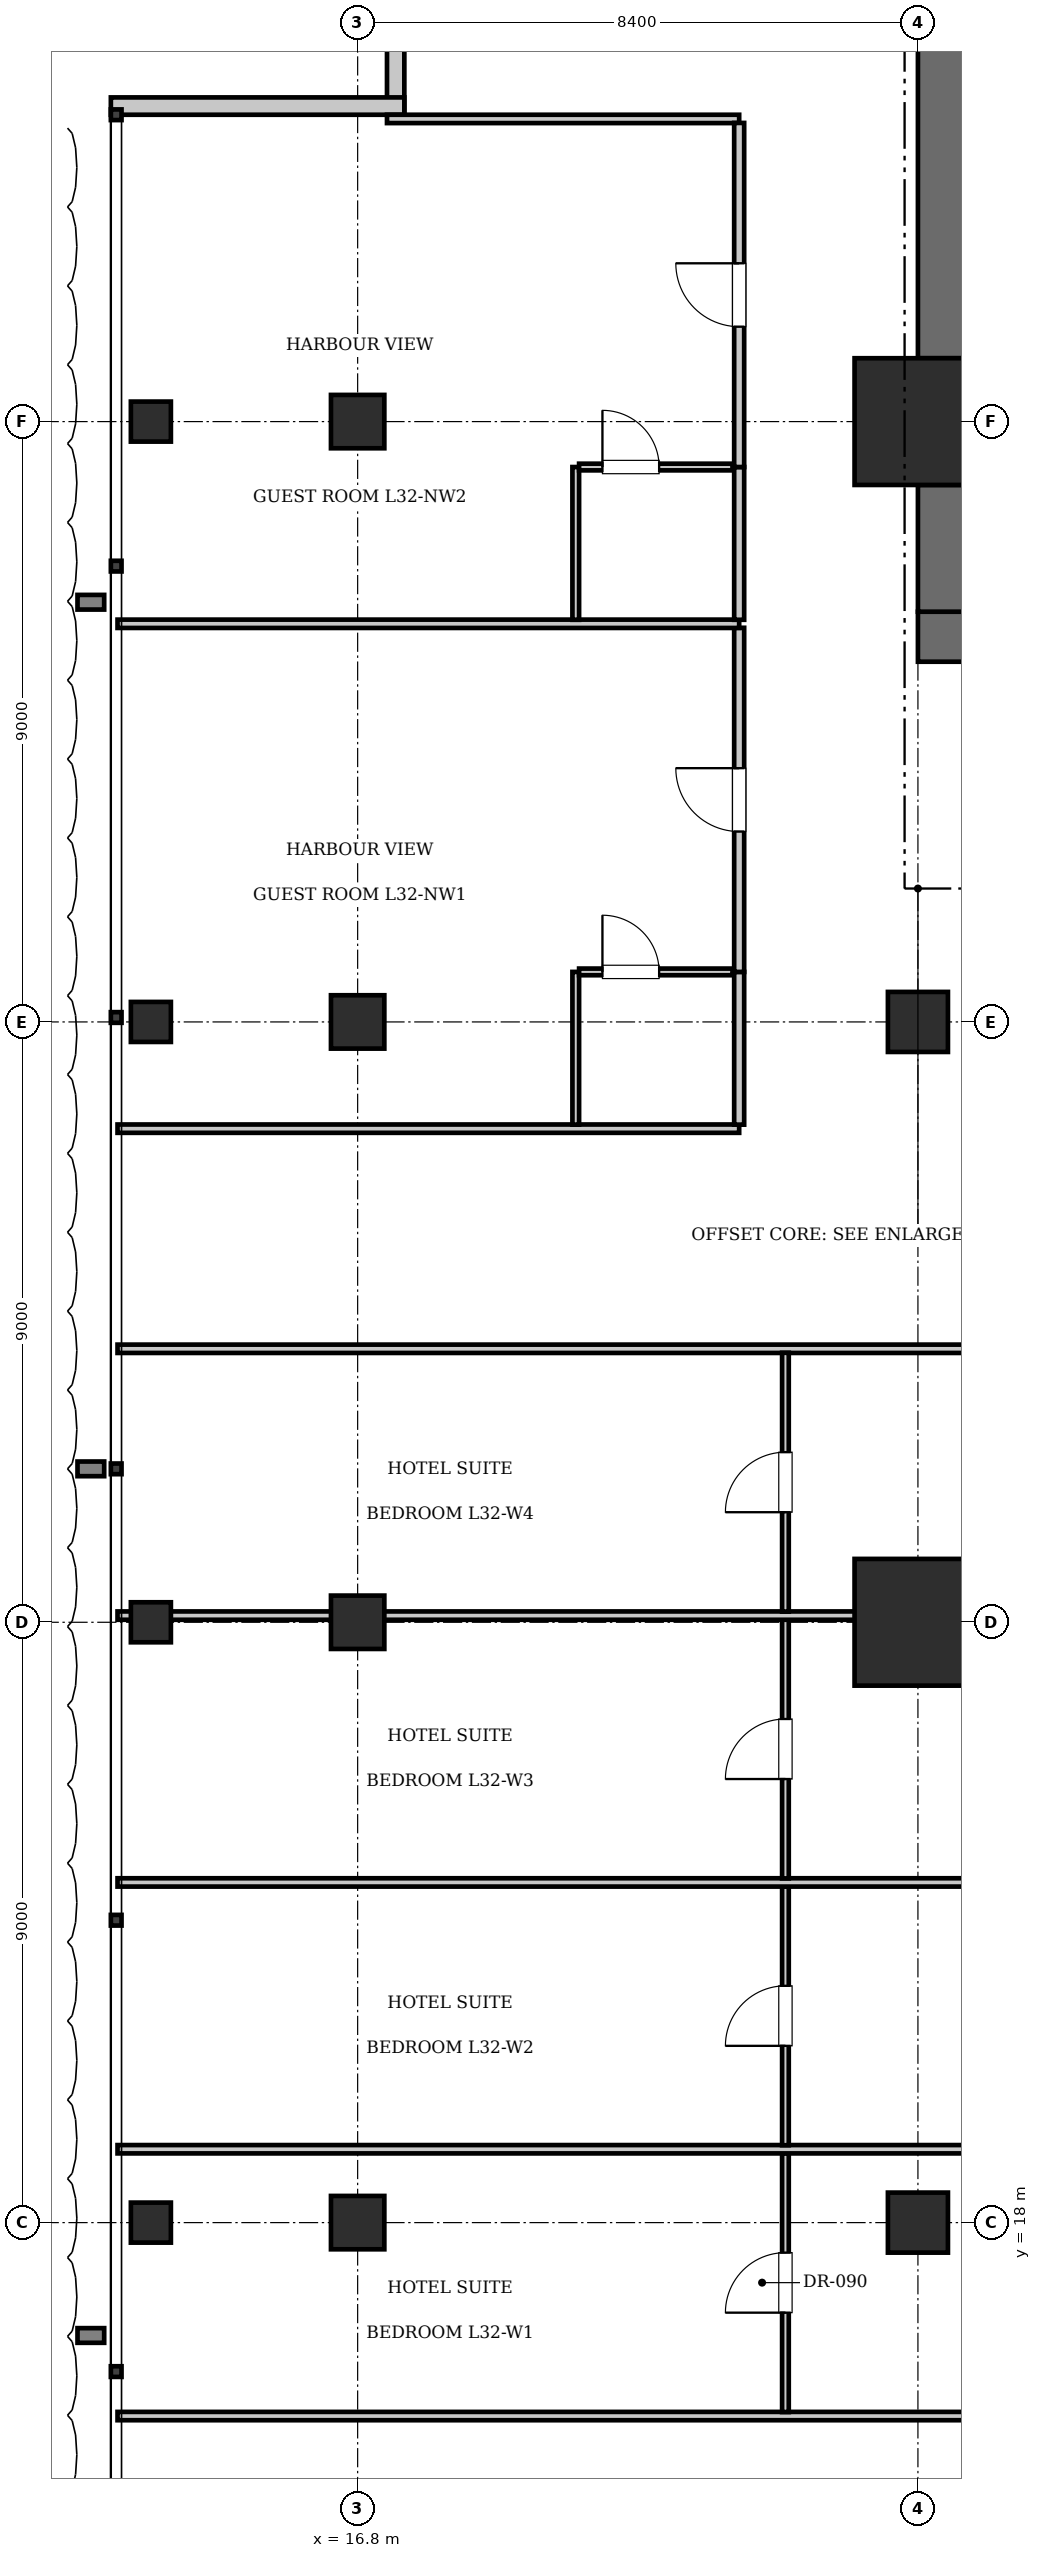
"""IFC4 building model, lengths in metres.
Left out: names, types, materials, properties, quantities, classifications, styles, units other than length and angle.
Written with IfcOpenShell. Run it as: python <this file> out.ifc"""

import sys

from ifc_helpers import new_model, si_unit, direction, frame, frame_2d, origin, origin_2d, place, context, subcontext, project, spatial, rectangle, i_section, extrude, element, fill, save


model = new_model("IFC4")
c1 = context("Model", 3, precision=1e-05, world=origin(), true_north=direction((0.0, 1.0)))
c2 = subcontext(c1, "Body", "Model", "MODEL_VIEW")
j1 = project(units=[si_unit("LENGTHUNIT", "METRE"), si_unit("PLANEANGLEUNIT", "RADIAN")], contexts=[c1])
p1 = place(None, origin())
s1 = spatial("IfcSite", under=j1, at=p1, CompositionType="ELEMENT")
p2 = place(p1, origin())
s2 = spatial("IfcBuilding", under=s1, at=p2, CompositionType="ELEMENT")
p3 = place(p2, frame((0.0, 0.0, 135.1)))
s3 = spatial("IfcBuildingStorey", under=s2, at=p3, CompositionType="ELEMENT", Elevation=135.1)
for number, where, z_axis, x_axis in (
    (1, (25.2, 27.0, 0.0), (0.0, 0.0, 1.0), (1.0, 0.0, 0.0)),
    (2, (25.2, 45.0, 0.0), (0.0, 0.0, 1.0), (1.0, 0.0, 0.0)),
):
    element("IfcColumn", number, at=place(p3, frame(where, z_axis=z_axis, x_axis=x_axis)), inside=s3, PredefinedType="COLUMN", context=c2, shape_type="SweptSolid", body=[
        extrude(rectangle(XDim=1.9, YDim=1.9, at=origin_2d()), origin(), (0.0, 0.0, 1.0), 3.85),
    ])
p4 = place(p3, frame((25.2, 41.775, 0.0), z_axis=(0.0, 0.0, 1.0), x_axis=(1.0, 0.0, 0.0)))
e3 = element("IfcWall", 3, at=p4, inside=s3, PredefinedType="SHEAR", context=c2, shape_type="SweptSolid", body=[
    extrude(rectangle(XDim=6.8, YDim=0.75, at=frame_2d((3.4, 0.0))), origin(), (0.0, 0.0, 1.0), 3.85),
])
p5 = place(p4, frame((1.65, 0.0, 0.0)))
e4 = element("IfcOpeningElement", 4, at=p5, cuts=e3, PredefinedType="OPENING", context=c2, shape_type="SweptSolid", body=[
    extrude(rectangle(XDim=1.15, YDim=2.15, at=frame_2d((0.575, 1.075))), frame((0.0, 0.385, 0.0), z_axis=(0.0, -1.0, 0.0), x_axis=(1.0, 0.0, 0.0)), (0.0, 0.0, 1.0), 0.77),
])
p6 = place(p4, frame((5.15, 0.0, 0.0)))
e5 = element("IfcOpeningElement", 5, at=p6, cuts=e3, PredefinedType="OPENING", context=c2, shape_type="SweptSolid", body=[
    extrude(rectangle(XDim=1.1, YDim=2.2, at=frame_2d((0.55, 1.1))), frame((0.0, 0.385, 0.0), z_axis=(0.0, -1.0, 0.0), x_axis=(1.0, 0.0, 0.0)), (0.0, 0.0, 1.0), 0.77),
])
p7 = place(p3, frame((25.575, 42.15, 0.0), z_axis=(0.0, 0.0, 1.0), x_axis=(0.0, 1.0, 0.0)))
e6 = element("IfcWall", 6, at=p7, inside=s3, PredefinedType="SHEAR", context=c2, shape_type="SweptSolid", body=[
    extrude(rectangle(XDim=1.9, YDim=0.75, at=frame_2d((0.95, 0.0))), origin(), (0.0, 0.0, 1.0), 3.85),
])
p8 = place(p3, frame((25.575, 45.95, 0.0), z_axis=(0.0, 0.0, 1.0), x_axis=(0.0, 1.0, 0.0)))
e7 = element("IfcWall", 7, at=p8, inside=s3, PredefinedType="SHEAR", context=c2, shape_type="SweptSolid", body=[
    extrude(rectangle(XDim=7.3, YDim=0.75, at=frame_2d((3.65, 0.0))), origin(), (0.0, 0.0, 1.0), 3.85),
])
for number, where, z_axis, x_axis in (
    (8, (25.2, 36.0, 0.0), (0.0, 0.0, 1.0), (1.0, 0.0, 0.0)),
    (9, (25.2, 18.0, 0.0), (0.0, 0.0, 1.0), (1.0, 0.0, 0.0)),
):
    element("IfcColumn", number, at=place(p3, frame(where, z_axis=z_axis, x_axis=x_axis)), inside=s3, PredefinedType="COLUMN", context=c2, shape_type="SweptSolid", body=[
        extrude(rectangle(XDim=0.9, YDim=0.9, at=origin_2d()), origin(), (0.0, 0.0, 1.0), 3.85),
    ])
for number, where, z_axis, x_axis in (
    (10, (16.8, 18.0, 0.0), (0.0, 0.0, 1.0), (1.0, 0.0, 0.0)),
    (11, (16.8, 27.0, 0.0), (0.0, 0.0, 1.0), (1.0, 0.0, 0.0)),
    (12, (16.8, 36.0, 0.0), (0.0, 0.0, 1.0), (1.0, 0.0, 0.0)),
    (13, (16.8, 45.0, 0.0), (0.0, 0.0, 1.0), (1.0, 0.0, 0.0)),
):
    element("IfcColumn", number, at=place(p3, frame(where, z_axis=z_axis, x_axis=x_axis)), inside=s3, PredefinedType="COLUMN", context=c2, shape_type="SweptSolid", body=[
        extrude(rectangle(XDim=0.8, YDim=0.8, at=origin_2d()), origin(), (0.0, 0.0, 1.0), 3.85),
    ])
for number, where, z_axis, x_axis in (
    (14, (13.7, 18.0, 0.0), (0.0, 0.0, 1.0), (1.0, 0.0, 0.0)),
    (15, (13.7, 27.0, 0.0), (0.0, 0.0, 1.0), (1.0, 0.0, 0.0)),
    (16, (13.7, 36.0, 0.0), (0.0, 0.0, 1.0), (1.0, 0.0, 0.0)),
    (17, (13.7, 45.0, 0.0), (0.0, 0.0, 1.0), (1.0, 0.0, 0.0)),
):
    element("IfcColumn", number, at=place(p3, frame(where, z_axis=z_axis, x_axis=x_axis)), inside=s3, PredefinedType="COLUMN", context=c2, shape_type="SweptSolid", body=[
        extrude(i_section(OverallWidth=0.6, OverallDepth=0.6, WebThickness=0.025, FlangeThickness=0.038, at=origin_2d()), origin(), (0.0, 0.0, 1.0), 3.85),
    ])
for number, where, z_axis, x_axis in (
    (18, (17.37, 49.6, 0.0), (0.0, 0.0, 1.0), (0.0, 1.0, 0.0)),
    (19, (13.1, 49.73, 0.0), (0.0, 0.0, 1.0), (1.0, 0.0, 0.0)),
):
    element("IfcWall", number, at=place(p3, frame(where, z_axis=z_axis, x_axis=x_axis)), inside=s3, PredefinedType="SOLIDWALL", context=c2, shape_type="SweptSolid", body=[
        extrude(rectangle(XDim=4.4, YDim=0.26, at=frame_2d((2.2, 0.0))), origin(), (0.0, 0.0, 1.0), 3.61),
    ])
for number, where, z_axis, x_axis in (
    (20, (13.2, 15.1, 0.0), (0.0, 0.0, 1.0), (1.0, 0.0, 0.0)),
    (21, (13.2, 31.1, 0.0), (0.0, 0.0, 1.0), (1.0, 0.0, 0.0)),
):
    element("IfcWall", number, at=place(p3, frame(where, z_axis=z_axis, x_axis=x_axis)), inside=s3, PredefinedType="PARTITIONING", context=c2, shape_type="SweptSolid", body=[
        extrude(rectangle(XDim=23.42, YDim=0.125, at=frame_2d((11.71, 0.0))), origin(), (0.0, 0.0, 1.0), 3.61),
    ])
p9 = place(p3, frame((23.214, 15.16, 0.0), z_axis=(0.0, 0.0, 1.0), x_axis=(0.0, 1.0, 0.0)))
e22 = element("IfcWall", 22, at=p9, inside=s3, PredefinedType="PARTITIONING", context=c2, shape_type="SweptSolid", body=[
    extrude(rectangle(XDim=3.88, YDim=0.1, at=frame_2d((1.94, 0.0))), origin(), (0.0, 0.0, 1.0), 3.61),
])
p10 = place(p9, frame((1.49, 0.0, 0.0)))
e23 = element("IfcOpeningElement", 23, at=p10, cuts=e22, PredefinedType="OPENING", context=c2, shape_type="SweptSolid", body=[
    extrude(rectangle(XDim=0.9, YDim=2.1, at=frame_2d((0.45, 1.05))), frame((0.0, 0.06, 0.0), z_axis=(0.0, -1.0, 0.0), x_axis=(1.0, 0.0, 0.0)), (0.0, 0.0, 1.0), 0.12),
])
p11 = place(p3, frame((13.2, 19.1, 0.0), z_axis=(0.0, 0.0, 1.0), x_axis=(1.0, 0.0, 0.0)))
e24 = element("IfcWall", 24, at=p11, inside=s3, PredefinedType="PARTITIONING", context=c2, shape_type="SweptSolid", body=[
    extrude(rectangle(XDim=23.42, YDim=0.125, at=frame_2d((11.71, 0.0))), origin(), (0.0, 0.0, 1.0), 3.61),
])
p12 = place(p3, frame((23.214, 19.16, 0.0), z_axis=(0.0, 0.0, 1.0), x_axis=(0.0, 1.0, 0.0)))
e25 = element("IfcWall", 25, at=p12, inside=s3, PredefinedType="PARTITIONING", context=c2, shape_type="SweptSolid", body=[
    extrude(rectangle(XDim=3.88, YDim=0.1, at=frame_2d((1.94, 0.0))), origin(), (0.0, 0.0, 1.0), 3.61),
])
p13 = place(p12, frame((1.49, 0.0, 0.0)))
e26 = element("IfcOpeningElement", 26, at=p13, cuts=e25, PredefinedType="OPENING", context=c2, shape_type="SweptSolid", body=[
    extrude(rectangle(XDim=0.9, YDim=2.1, at=frame_2d((0.45, 1.05))), frame((0.0, 0.06, 0.0), z_axis=(0.0, -1.0, 0.0), x_axis=(1.0, 0.0, 0.0)), (0.0, 0.0, 1.0), 0.12),
])
p14 = place(p3, frame((13.2, 23.1, 0.0), z_axis=(0.0, 0.0, 1.0), x_axis=(1.0, 0.0, 0.0)))
e27 = element("IfcWall", 27, at=p14, inside=s3, PredefinedType="PARTITIONING", context=c2, shape_type="SweptSolid", body=[
    extrude(rectangle(XDim=23.42, YDim=0.125, at=frame_2d((11.71, 0.0))), origin(), (0.0, 0.0, 1.0), 3.61),
])
p15 = place(p3, frame((23.214, 23.16, 0.0), z_axis=(0.0, 0.0, 1.0), x_axis=(0.0, 1.0, 0.0)))
e28 = element("IfcWall", 28, at=p15, inside=s3, PredefinedType="PARTITIONING", context=c2, shape_type="SweptSolid", body=[
    extrude(rectangle(XDim=3.88, YDim=0.1, at=frame_2d((1.94, 0.0))), origin(), (0.0, 0.0, 1.0), 3.61),
])
p16 = place(p15, frame((1.49, 0.0, 0.0)))
e29 = element("IfcOpeningElement", 29, at=p16, cuts=e28, PredefinedType="OPENING", context=c2, shape_type="SweptSolid", body=[
    extrude(rectangle(XDim=0.9, YDim=2.1, at=frame_2d((0.45, 1.05))), frame((0.0, 0.06, 0.0), z_axis=(0.0, -1.0, 0.0), x_axis=(1.0, 0.0, 0.0)), (0.0, 0.0, 1.0), 0.12),
])
p17 = place(p3, frame((13.2, 27.1, 0.0), z_axis=(0.0, 0.0, 1.0), x_axis=(1.0, 0.0, 0.0)))
e30 = element("IfcWall", 30, at=p17, inside=s3, PredefinedType="PARTITIONING", context=c2, shape_type="SweptSolid", body=[
    extrude(rectangle(XDim=23.42, YDim=0.125, at=frame_2d((11.71, 0.0))), origin(), (0.0, 0.0, 1.0), 2.41),
])
p18 = place(p3, frame((23.214, 27.16, 0.0), z_axis=(0.0, 0.0, 1.0), x_axis=(0.0, 1.0, 0.0)))
e31 = element("IfcWall", 31, at=p18, inside=s3, PredefinedType="PARTITIONING", context=c2, shape_type="SweptSolid", body=[
    extrude(rectangle(XDim=3.88, YDim=0.1, at=frame_2d((1.94, 0.0))), origin(), (0.0, 0.0, 1.0), 3.61),
])
p19 = place(p18, frame((1.49, 0.0, 0.0)))
e32 = element("IfcOpeningElement", 32, at=p19, cuts=e31, PredefinedType="OPENING", context=c2, shape_type="SweptSolid", body=[
    extrude(rectangle(XDim=0.9, YDim=2.1, at=frame_2d((0.45, 1.05))), frame((0.0, 0.06, 0.0), z_axis=(0.0, -1.0, 0.0), x_axis=(1.0, 0.0, 0.0)), (0.0, 0.0, 1.0), 0.12),
])
p20 = place(p3, frame((13.2, 34.4, 0.0), z_axis=(0.0, 0.0, 1.0), x_axis=(1.0, 0.0, 0.0)))
e33 = element("IfcWall", 33, at=p20, inside=s3, PredefinedType="PARTITIONING", context=c2, shape_type="SweptSolid", body=[
    extrude(rectangle(XDim=9.32, YDim=0.125, at=frame_2d((4.66, 0.0))), origin(), (0.0, 0.0, 1.0), 3.61),
])
p21 = place(p3, frame((17.24, 49.538, 0.0), z_axis=(0.0, 0.0, 1.0), x_axis=(1.0, 0.0, 0.0)))
e34 = element("IfcWall", 34, at=p21, inside=s3, PredefinedType="PARTITIONING", context=c2, shape_type="SweptSolid", body=[
    extrude(rectangle(XDim=5.28, YDim=0.125, at=frame_2d((2.64, 0.0))), origin(), (0.0, 0.0, 1.0), 3.61),
])
p22 = place(p3, frame((22.52, 34.46, 0.0), z_axis=(0.0, 0.0, 1.0), x_axis=(0.0, 1.0, 0.0)))
e35 = element("IfcWall", 35, at=p22, inside=s3, PredefinedType="PARTITIONING", context=c2, shape_type="SweptSolid", body=[
    extrude(rectangle(XDim=2.29, YDim=0.15, at=frame_2d((1.145, 0.0))), origin(), (0.0, 0.0, 1.0), 3.61),
])
p23 = place(p3, frame((22.52, 36.75, 0.0), z_axis=(0.0, 0.0, 1.0), x_axis=(0.0, 1.0, 0.0)))
e36 = element("IfcWall", 36, at=p23, inside=s3, PredefinedType="PARTITIONING", context=c2, shape_type="SweptSolid", body=[
    extrude(rectangle(XDim=5.159, YDim=0.15, at=frame_2d((2.579, 0.0))), origin(), (0.0, 0.0, 1.0), 3.61),
])
p24 = place(p23, frame((2.104, 0.0, 0.0)))
e37 = element("IfcOpeningElement", 37, at=p24, cuts=e36, PredefinedType="OPENING", context=c2, shape_type="SweptSolid", body=[
    extrude(rectangle(XDim=0.95, YDim=2.15, at=frame_2d((0.475, 1.075))), frame((0.0, 0.085, 0.0), z_axis=(0.0, -1.0, 0.0), x_axis=(1.0, 0.0, 0.0)), (0.0, 0.0, 1.0), 0.17),
])
p25 = place(p3, frame((20.07, 34.46, 0.0), z_axis=(0.0, 0.0, 1.0), x_axis=(0.0, 1.0, 0.0)))
e38 = element("IfcWall", 38, at=p25, inside=s3, PredefinedType="PARTITIONING", context=c2, shape_type="SweptSolid", body=[
    extrude(rectangle(XDim=2.29, YDim=0.1, at=frame_2d((1.145, 0.0))), origin(), (0.0, 0.0, 1.0), 3.61),
])
p26 = place(p3, frame((20.12, 36.75, 0.0), z_axis=(0.0, 0.0, 1.0), x_axis=(1.0, 0.0, 0.0)))
e39 = element("IfcWall", 39, at=p26, inside=s3, PredefinedType="PARTITIONING", context=c2, shape_type="SweptSolid", body=[
    extrude(rectangle(XDim=2.3, YDim=0.1, at=frame_2d((1.15, 0.0))), origin(), (0.0, 0.0, 1.0), 3.61),
])
p27 = place(p26, frame((0.35, 0.0, 0.0)))
e40 = element("IfcOpeningElement", 40, at=p27, cuts=e39, PredefinedType="OPENING", context=c2, shape_type="SweptSolid", body=[
    extrude(rectangle(XDim=0.85, YDim=2.1, at=frame_2d((0.425, 1.05))), frame((0.0, 0.06, 0.0), z_axis=(0.0, -1.0, 0.0), x_axis=(1.0, 0.0, 0.0)), (0.0, 0.0, 1.0), 0.12),
])
p28 = place(p3, frame((13.2, 41.969, 0.0), z_axis=(0.0, 0.0, 1.0), x_axis=(1.0, 0.0, 0.0)))
e41 = element("IfcWall", 41, at=p28, inside=s3, PredefinedType="PARTITIONING", context=c2, shape_type="SweptSolid", body=[
    extrude(rectangle(XDim=9.32, YDim=0.125, at=frame_2d((4.66, 0.0))), origin(), (0.0, 0.0, 1.0), 3.61),
])
p29 = place(p3, frame((22.52, 42.029, 0.0), z_axis=(0.0, 0.0, 1.0), x_axis=(0.0, 1.0, 0.0)))
e42 = element("IfcWall", 42, at=p29, inside=s3, PredefinedType="PARTITIONING", context=c2, shape_type="SweptSolid", body=[
    extrude(rectangle(XDim=2.29, YDim=0.15, at=frame_2d((1.145, 0.0))), origin(), (0.0, 0.0, 1.0), 3.61),
])
p30 = place(p3, frame((22.52, 44.319, 0.0), z_axis=(0.0, 0.0, 1.0), x_axis=(0.0, 1.0, 0.0)))
e43 = element("IfcWall", 43, at=p30, inside=s3, PredefinedType="PARTITIONING", context=c2, shape_type="SweptSolid", body=[
    extrude(rectangle(XDim=5.159, YDim=0.15, at=frame_2d((2.579, 0.0))), origin(), (0.0, 0.0, 1.0), 3.61),
])
p31 = place(p30, frame((2.104, 0.0, 0.0)))
e44 = element("IfcOpeningElement", 44, at=p31, cuts=e43, PredefinedType="OPENING", context=c2, shape_type="SweptSolid", body=[
    extrude(rectangle(XDim=0.95, YDim=2.15, at=frame_2d((0.475, 1.075))), frame((0.0, 0.085, 0.0), z_axis=(0.0, -1.0, 0.0), x_axis=(1.0, 0.0, 0.0)), (0.0, 0.0, 1.0), 0.17),
])
p32 = place(p3, frame((20.07, 42.029, 0.0), z_axis=(0.0, 0.0, 1.0), x_axis=(0.0, 1.0, 0.0)))
e45 = element("IfcWall", 45, at=p32, inside=s3, PredefinedType="PARTITIONING", context=c2, shape_type="SweptSolid", body=[
    extrude(rectangle(XDim=2.29, YDim=0.1, at=frame_2d((1.145, 0.0))), origin(), (0.0, 0.0, 1.0), 3.61),
])
p33 = place(p3, frame((20.12, 44.319, 0.0), z_axis=(0.0, 0.0, 1.0), x_axis=(1.0, 0.0, 0.0)))
e46 = element("IfcWall", 46, at=p33, inside=s3, PredefinedType="PARTITIONING", context=c2, shape_type="SweptSolid", body=[
    extrude(rectangle(XDim=2.3, YDim=0.1, at=frame_2d((1.15, 0.0))), origin(), (0.0, 0.0, 1.0), 3.61),
])
p34 = place(p33, frame((0.35, 0.0, 0.0)))
e47 = element("IfcOpeningElement", 47, at=p34, cuts=e46, PredefinedType="OPENING", context=c2, shape_type="SweptSolid", body=[
    extrude(rectangle(XDim=0.85, YDim=2.1, at=frame_2d((0.425, 1.05))), frame((0.0, 0.06, 0.0), z_axis=(0.0, -1.0, 0.0), x_axis=(1.0, 0.0, 0.0)), (0.0, 0.0, 1.0), 0.12),
])
p35 = place(p10, origin())
e48 = element("IfcDoor", 48, at=p35, inside=s3, OperationType="SINGLE_SWING_LEFT", PredefinedType="DOOR", context=c2, shape_type="SweptSolid", body=[
    extrude(rectangle(XDim=0.9, YDim=2.1, at=frame_2d((0.45, 1.05))), frame((0.0, 0.025, 0.0), z_axis=(0.0, -1.0, 0.0), x_axis=(1.0, 0.0, 0.0)), (0.0, 0.0, 1.0), 0.05),
])
fill(e23, e48)
p36 = place(p13, origin())
e49 = element("IfcDoor", 49, at=p36, inside=s3, OperationType="SINGLE_SWING_LEFT", PredefinedType="DOOR", context=c2, shape_type="SweptSolid", body=[
    extrude(rectangle(XDim=0.9, YDim=2.1, at=frame_2d((0.45, 1.05))), frame((0.0, 0.025, 0.0), z_axis=(0.0, -1.0, 0.0), x_axis=(1.0, 0.0, 0.0)), (0.0, 0.0, 1.0), 0.05),
])
fill(e26, e49)
p37 = place(p16, origin())
e50 = element("IfcDoor", 50, at=p37, inside=s3, OperationType="SINGLE_SWING_LEFT", PredefinedType="DOOR", context=c2, shape_type="SweptSolid", body=[
    extrude(rectangle(XDim=0.9, YDim=2.1, at=frame_2d((0.45, 1.05))), frame((0.0, 0.025, 0.0), z_axis=(0.0, -1.0, 0.0), x_axis=(1.0, 0.0, 0.0)), (0.0, 0.0, 1.0), 0.05),
])
fill(e29, e50)
p38 = place(p19, origin())
e51 = element("IfcDoor", 51, at=p38, inside=s3, OperationType="SINGLE_SWING_LEFT", PredefinedType="DOOR", context=c2, shape_type="SweptSolid", body=[
    extrude(rectangle(XDim=0.9, YDim=2.1, at=frame_2d((0.45, 1.05))), frame((0.0, 0.025, 0.0), z_axis=(0.0, -1.0, 0.0), x_axis=(1.0, 0.0, 0.0)), (0.0, 0.0, 1.0), 0.05),
])
fill(e32, e51)
p39 = place(p27, origin())
e52 = element("IfcDoor", 52, at=p39, inside=s3, OperationType="SINGLE_SWING_LEFT", PredefinedType="DOOR", context=c2, shape_type="SweptSolid", body=[
    extrude(rectangle(XDim=0.85, YDim=2.1, at=frame_2d((0.425, 1.05))), frame((0.0, 0.025, 0.0), z_axis=(0.0, -1.0, 0.0), x_axis=(1.0, 0.0, 0.0)), (0.0, 0.0, 1.0), 0.05),
])
fill(e40, e52)
p40 = place(p24, origin())
e53 = element("IfcDoor", 53, at=p40, inside=s3, OperationType="SINGLE_SWING_RIGHT", PredefinedType="DOOR", context=c2, shape_type="SweptSolid", body=[
    extrude(rectangle(XDim=0.95, YDim=2.15, at=frame_2d((0.475, 1.075))), frame((0.0, 0.025, 0.0), z_axis=(0.0, -1.0, 0.0), x_axis=(1.0, 0.0, 0.0)), (0.0, 0.0, 1.0), 0.05),
])
fill(e37, e53)
p41 = place(p34, origin())
e54 = element("IfcDoor", 54, at=p41, inside=s3, OperationType="SINGLE_SWING_LEFT", PredefinedType="DOOR", context=c2, shape_type="SweptSolid", body=[
    extrude(rectangle(XDim=0.85, YDim=2.1, at=frame_2d((0.425, 1.05))), frame((0.0, 0.025, 0.0), z_axis=(0.0, -1.0, 0.0), x_axis=(1.0, 0.0, 0.0)), (0.0, 0.0, 1.0), 0.05),
])
fill(e47, e54)
p42 = place(p31, origin())
e55 = element("IfcDoor", 55, at=p42, inside=s3, OperationType="SINGLE_SWING_RIGHT", PredefinedType="DOOR", context=c2, shape_type="SweptSolid", body=[
    extrude(rectangle(XDim=0.95, YDim=2.15, at=frame_2d((0.475, 1.075))), frame((0.0, 0.025, 0.0), z_axis=(0.0, -1.0, 0.0), x_axis=(1.0, 0.0, 0.0)), (0.0, 0.0, 1.0), 0.05),
])
fill(e44, e55)
save(model, sys.argv[1])
